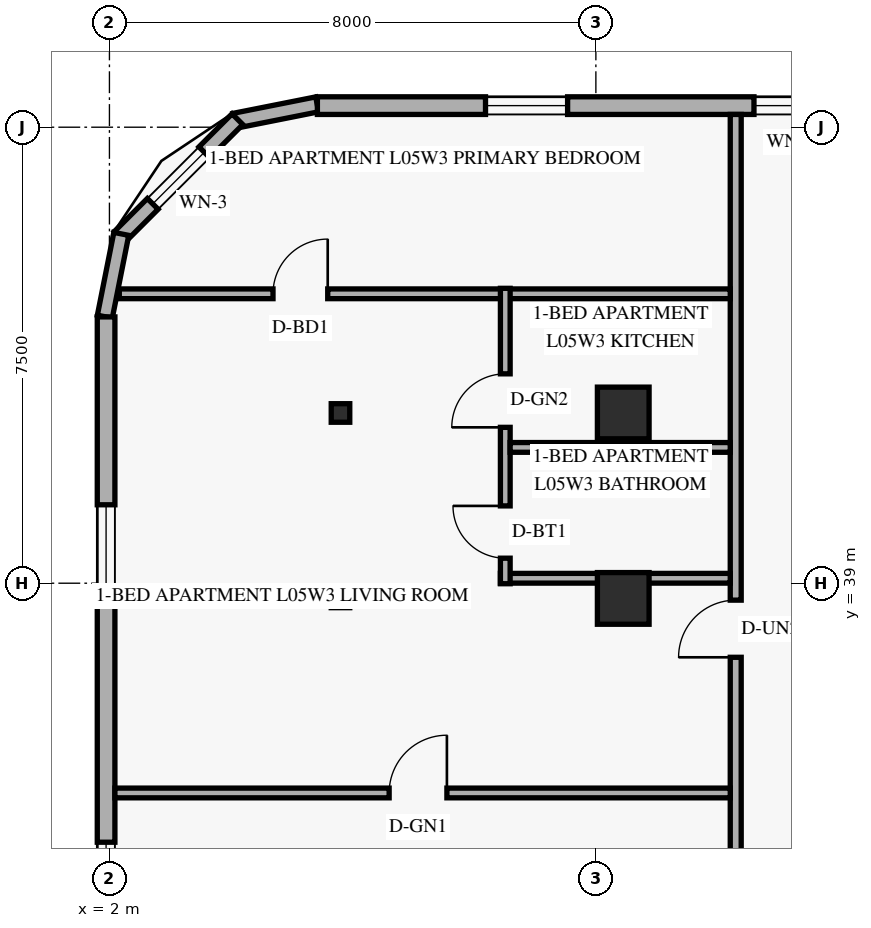
"""IFC4 building model, lengths in metres.
Left out: names, types, materials, properties, quantities, classifications, styles, units other than length and angle.
Written with IfcOpenShell. Run it as: python <this file> out.ifc"""

import sys

from ifc_helpers import new_model, si_unit, direction, frame, frame_2d, origin, origin_2d, place, context, subcontext, project, spatial, rectangle, hollow_rectangle, extrude, element, fill, save


model = new_model("IFC4")
c1 = context("Model", 3, precision=1e-05, world=origin(), true_north=direction((0.0, 1.0)))
c2 = subcontext(c1, "Body", "Model", "MODEL_VIEW")
j1 = project(units=[si_unit("LENGTHUNIT", "METRE"), si_unit("PLANEANGLEUNIT", "RADIAN")], contexts=[c1])
p1 = place(None, origin())
s1 = spatial("IfcSite", under=j1, at=p1, CompositionType="ELEMENT")
p2 = place(p1, origin())
s2 = spatial("IfcBuilding", under=s1, at=p2, CompositionType="ELEMENT")
p3 = place(p2, frame((0.0, 0.0, 24.0)))
s3 = spatial("IfcBuildingStorey", under=s2, at=p3, CompositionType="ELEMENT", Elevation=24.0)
for number, where, z_axis, x_axis in (
    (1, (5.8, 38.75, -0.3), (0.0, 0.0, 1.0), (1.0, 0.0, 0.0)),
    (2, (5.8, 41.8, -0.3), (0.0, 0.0, 1.0), (1.0, 0.0, 0.0)),
):
    element("IfcColumn", number, at=place(p3, frame(where, z_axis=z_axis, x_axis=x_axis)), inside=s3, PredefinedType="COLUMN", context=c2, shape_type="SweptSolid", body=[
        extrude(hollow_rectangle(XDim=0.305, YDim=0.305, WallThickness=0.013, at=origin_2d()), origin(), (0.0, 0.0, 1.0), 3.9),
    ])
for number, where, z_axis, x_axis in (
    (3, (10.45, 38.75, 0.0), (0.0, 0.0, 1.0), (1.0, 0.0, 0.0)),
    (4, (10.45, 41.8, 0.0), (0.0, 0.0, 1.0), (1.0, 0.0, 0.0)),
):
    element("IfcColumn", number, at=place(p3, frame(where, z_axis=z_axis, x_axis=x_axis)), inside=s3, PredefinedType="COLUMN", context=c2, shape_type="SweptSolid", body=[
        extrude(rectangle(XDim=0.85, YDim=0.85, at=origin_2d()), origin(), (0.0, 0.0, 1.0), 3.6),
    ])
p4 = place(p3, frame((5.417, 46.876, 0.0), z_axis=(0.0, 0.0, 1.0), x_axis=(-0.980809899341, -0.19496651342, 0.0)))
e5 = element("IfcWall", 5, at=p4, inside=s3, PredefinedType="SOLIDWALL", context=c2, shape_type="SweptSolid", body=[
    extrude(rectangle(XDim=1.389, YDim=0.25, at=frame_2d((0.694, 0.0))), origin(), (0.0, 0.0, 1.0), 3.36),
])
p5 = place(p3, frame((4.105, 46.632, 0.0), z_axis=(0.0, 0.0, 1.0), x_axis=(-0.707106781187, -0.707106781187, 0.0)))
e6 = element("IfcWall", 6, at=p5, inside=s3, PredefinedType="SOLIDWALL", context=c2, shape_type="SweptSolid", body=[
    extrude(rectangle(XDim=2.739, YDim=0.25, at=frame_2d((1.37, 0.0))), origin(), (0.0, 0.0, 1.0), 3.36),
])
p6 = place(p5, frame((0.77, 0.0, 0.85)))
e7 = element("IfcOpeningElement", 7, at=p6, cuts=e6, PredefinedType="OPENING", context=c2, shape_type="SweptSolid", body=[
    extrude(rectangle(XDim=1.2, YDim=1.5, at=frame_2d((0.6, 0.75))), frame((0.0, 0.135, 0.0), z_axis=(0.0, -1.0, 0.0), x_axis=(1.0, 0.0, 0.0)), (0.0, 0.0, 1.0), 0.27),
])
p7 = place(p3, frame((2.195, 44.746, 0.0), z_axis=(0.0, 0.0, 1.0), x_axis=(-0.19496651342, -0.980809899341, 0.0)))
e8 = element("IfcWall", 8, at=p7, inside=s3, PredefinedType="SOLIDWALL", context=c2, shape_type="SweptSolid", body=[
    extrude(rectangle(XDim=1.389, YDim=0.25, at=frame_2d((0.694, 0.0))), origin(), (0.0, 0.0, 1.0), 3.36),
])
p8 = place(p3, frame((44.98, 46.855, 0.0), z_axis=(0.0, 0.0, 1.0), x_axis=(-1.0, 0.0, 0.0)))
e9 = element("IfcWall", 9, at=p8, inside=s3, PredefinedType="SOLIDWALL", context=c2, shape_type="SweptSolid", body=[
    extrude(rectangle(XDim=39.56, YDim=0.29, at=frame_2d((19.78, 0.0))), origin(), (0.0, 0.0, 1.0), 3.36),
])
p9 = place(p8, frame((35.445, 0.0, 0.85)))
e10 = element("IfcOpeningElement", 10, at=p9, cuts=e9, PredefinedType="OPENING", context=c2, shape_type="SweptSolid", body=[
    extrude(rectangle(XDim=1.35, YDim=1.55, at=frame_2d((0.675, 0.775))), frame((0.0, 0.155, 0.0), z_axis=(0.0, -1.0, 0.0), x_axis=(1.0, 0.0, 0.0)), (0.0, 0.0, 1.0), 0.31),
])
p10 = place(p8, frame((31.18, 0.0, 0.85)))
e11 = element("IfcOpeningElement", 11, at=p10, cuts=e9, PredefinedType="OPENING", context=c2, shape_type="SweptSolid", body=[
    extrude(rectangle(XDim=1.2, YDim=1.5, at=frame_2d((0.6, 0.75))), frame((0.0, 0.155, 0.0), z_axis=(0.0, -1.0, 0.0), x_axis=(1.0, 0.0, 0.0)), (0.0, 0.0, 1.0), 0.31),
])
p11 = place(p8, frame((26.85, 0.0, 0.85)))
e12 = element("IfcOpeningElement", 12, at=p11, cuts=e9, PredefinedType="OPENING", context=c2, shape_type="SweptSolid", body=[
    extrude(rectangle(XDim=1.35, YDim=1.55, at=frame_2d((0.675, 0.775))), frame((0.0, 0.155, 0.0), z_axis=(0.0, -1.0, 0.0), x_axis=(1.0, 0.0, 0.0)), (0.0, 0.0, 1.0), 0.31),
])
p12 = place(p8, frame((21.425, 0.0, 0.85)))
e13 = element("IfcOpeningElement", 13, at=p12, cuts=e9, PredefinedType="OPENING", context=c2, shape_type="SweptSolid", body=[
    extrude(rectangle(XDim=1.35, YDim=1.55, at=frame_2d((0.675, 0.775))), frame((0.0, 0.155, 0.0), z_axis=(0.0, -1.0, 0.0), x_axis=(1.0, 0.0, 0.0)), (0.0, 0.0, 1.0), 0.31),
])
p13 = place(p8, frame((16.19, 0.0, 0.85)))
e14 = element("IfcOpeningElement", 14, at=p13, cuts=e9, PredefinedType="OPENING", context=c2, shape_type="SweptSolid", body=[
    extrude(rectangle(XDim=1.35, YDim=1.55, at=frame_2d((0.675, 0.775))), frame((0.0, 0.155, 0.0), z_axis=(0.0, -1.0, 0.0), x_axis=(1.0, 0.0, 0.0)), (0.0, 0.0, 1.0), 0.31),
])
p14 = place(p8, frame((10.955, 0.0, 0.85)))
e15 = element("IfcOpeningElement", 15, at=p14, cuts=e9, PredefinedType="OPENING", context=c2, shape_type="SweptSolid", body=[
    extrude(rectangle(XDim=1.35, YDim=1.55, at=frame_2d((0.675, 0.775))), frame((0.0, 0.155, 0.0), z_axis=(0.0, -1.0, 0.0), x_axis=(1.0, 0.0, 0.0)), (0.0, 0.0, 1.0), 0.31),
])
p15 = place(p8, frame((7.82, 0.0, 0.85)))
e16 = element("IfcOpeningElement", 16, at=p15, cuts=e9, PredefinedType="OPENING", context=c2, shape_type="SweptSolid", body=[
    extrude(rectangle(XDim=1.35, YDim=1.55, at=frame_2d((0.675, 0.775))), frame((0.0, 0.155, 0.0), z_axis=(0.0, -1.0, 0.0), x_axis=(1.0, 0.0, 0.0)), (0.0, 0.0, 1.0), 0.31),
])
p16 = place(p8, frame((3.04, 0.0, 0.85)))
e17 = element("IfcOpeningElement", 17, at=p16, cuts=e9, PredefinedType="OPENING", context=c2, shape_type="SweptSolid", body=[
    extrude(rectangle(XDim=1.35, YDim=1.55, at=frame_2d((0.675, 0.775))), frame((0.0, 0.155, 0.0), z_axis=(0.0, -1.0, 0.0), x_axis=(1.0, 0.0, 0.0)), (0.0, 0.0, 1.0), 0.31),
])
p17 = place(p3, frame((1.945, 43.38, 0.0), z_axis=(0.0, 0.0, 1.0), x_axis=(0.0, -1.0, 0.0)))
e18 = element("IfcWall", 18, at=p17, inside=s3, PredefinedType="SOLIDWALL", context=c2, shape_type="SweptSolid", body=[
    extrude(rectangle(XDim=38.76, YDim=0.29, at=frame_2d((19.38, 0.0))), origin(), (0.0, 0.0, 1.0), 3.36),
])
p18 = place(p17, frame((31.925, 0.0, 0.85)))
e19 = element("IfcOpeningElement", 19, at=p18, cuts=e18, PredefinedType="OPENING", context=c2, shape_type="SweptSolid", body=[
    extrude(rectangle(XDim=1.65, YDim=1.6, at=frame_2d((0.825, 0.8))), frame((0.0, 0.155, 0.0), z_axis=(0.0, -1.0, 0.0), x_axis=(1.0, 0.0, 0.0)), (0.0, 0.0, 1.0), 0.31),
])
p19 = place(p17, frame((23.913, 0.0, 0.85)))
e20 = element("IfcOpeningElement", 20, at=p19, cuts=e18, PredefinedType="OPENING", context=c2, shape_type="SweptSolid", body=[
    extrude(rectangle(XDim=1.65, YDim=1.6, at=frame_2d((0.825, 0.8))), frame((0.0, 0.155, 0.0), z_axis=(0.0, -1.0, 0.0), x_axis=(1.0, 0.0, 0.0)), (0.0, 0.0, 1.0), 0.31),
])
p20 = place(p17, frame((18.088, 0.0, 0.85)))
e21 = element("IfcOpeningElement", 21, at=p20, cuts=e18, PredefinedType="OPENING", context=c2, shape_type="SweptSolid", body=[
    extrude(rectangle(XDim=1.65, YDim=1.6, at=frame_2d((0.825, 0.8))), frame((0.0, 0.155, 0.0), z_axis=(0.0, -1.0, 0.0), x_axis=(1.0, 0.0, 0.0)), (0.0, 0.0, 1.0), 0.31),
])
p21 = place(p17, frame((12.27, 0.0, 0.85)))
e22 = element("IfcOpeningElement", 22, at=p21, cuts=e18, PredefinedType="OPENING", context=c2, shape_type="SweptSolid", body=[
    extrude(rectangle(XDim=1.65, YDim=1.6, at=frame_2d((0.825, 0.8))), frame((0.0, 0.155, 0.0), z_axis=(0.0, -1.0, 0.0), x_axis=(1.0, 0.0, 0.0)), (0.0, 0.0, 1.0), 0.31),
])
p22 = place(p17, frame((8.64, 0.0, 0.85)))
e23 = element("IfcOpeningElement", 23, at=p22, cuts=e18, PredefinedType="OPENING", context=c2, shape_type="SweptSolid", body=[
    extrude(rectangle(XDim=1.65, YDim=1.6, at=frame_2d((0.825, 0.8))), frame((0.0, 0.155, 0.0), z_axis=(0.0, -1.0, 0.0), x_axis=(1.0, 0.0, 0.0)), (0.0, 0.0, 1.0), 0.31),
])
p23 = place(p17, frame((3.09, 0.0, 0.85)))
e24 = element("IfcOpeningElement", 24, at=p23, cuts=e18, PredefinedType="OPENING", context=c2, shape_type="SweptSolid", body=[
    extrude(rectangle(XDim=1.65, YDim=1.6, at=frame_2d((0.825, 0.8))), frame((0.0, 0.155, 0.0), z_axis=(0.0, -1.0, 0.0), x_axis=(1.0, 0.0, 0.0)), (0.0, 0.0, 1.0), 0.31),
])
p24 = place(p3, frame((12.3, 1.29, 0.0), z_axis=(0.0, 0.0, 1.0), x_axis=(0.0, 1.0, 0.0)))
e25 = element("IfcWall", 25, at=p24, inside=s3, PredefinedType="STANDARD", context=c2, shape_type="SweptSolid", body=[
    extrude(rectangle(XDim=45.42, YDim=0.18, at=frame_2d((22.71, 0.0))), origin(), (0.0, 0.0, 1.0), 2.649),
])
p25 = place(p24, frame((9.41, 0.0, 0.0)))
e26 = element("IfcOpeningElement", 26, at=p25, cuts=e25, PredefinedType="OPENING", context=c2, shape_type="SweptSolid", body=[
    extrude(rectangle(XDim=0.94, YDim=2.15, at=frame_2d((0.47, 1.075))), frame((0.0, 0.1, 0.0), z_axis=(0.0, -1.0, 0.0), x_axis=(1.0, 0.0, 0.0)), (0.0, 0.0, 1.0), 0.2),
])
p26 = place(p24, frame((21.05, 0.0, 0.0)))
e27 = element("IfcOpeningElement", 27, at=p26, cuts=e25, PredefinedType="OPENING", context=c2, shape_type="SweptSolid", body=[
    extrude(rectangle(XDim=0.94, YDim=2.15, at=frame_2d((0.47, 1.075))), frame((0.0, 0.1, 0.0), z_axis=(0.0, -1.0, 0.0), x_axis=(1.0, 0.0, 0.0)), (0.0, 0.0, 1.0), 0.2),
])
p27 = place(p24, frame((36.491, 0.0, 0.0)))
e28 = element("IfcOpeningElement", 28, at=p27, cuts=e25, PredefinedType="OPENING", context=c2, shape_type="SweptSolid", body=[
    extrude(rectangle(XDim=0.94, YDim=2.15, at=frame_2d((0.47, 1.075))), frame((0.0, 0.1, 0.0), z_axis=(0.0, -1.0, 0.0), x_axis=(1.0, 0.0, 0.0)), (0.0, 0.0, 1.0), 0.2),
])
p28 = place(p3, frame((2.162, 43.76, 0.0), z_axis=(0.0, 0.0, 1.0), x_axis=(1.0, 0.0, 0.0)))
e29 = element("IfcWall", 29, at=p28, inside=s3, PredefinedType="PARTITIONING", context=c2, shape_type="SweptSolid", body=[
    extrude(rectangle(XDim=10.048, YDim=0.16, at=frame_2d((5.024, 0.0))), origin(), (0.0, 0.0, 1.0), 3.36),
])
p29 = place(p28, frame((2.528, 0.0, 0.0)))
e30 = element("IfcOpeningElement", 30, at=p29, cuts=e29, PredefinedType="OPENING", context=c2, shape_type="SweptSolid", body=[
    extrude(rectangle(XDim=0.9, YDim=2.14, at=frame_2d((0.45, 1.07))), frame((0.0, 0.09, 0.0), z_axis=(0.0, -1.0, 0.0), x_axis=(1.0, 0.0, 0.0)), (0.0, 0.0, 1.0), 0.18),
])
p30 = place(p3, frame((8.43, 39.082, 0.0), z_axis=(0.0, 0.0, 1.0), x_axis=(1.0, 0.0, 0.0)))
e31 = element("IfcWall", 31, at=p30, inside=s3, PredefinedType="PLUMBINGWALL", context=c2, shape_type="SweptSolid", body=[
    extrude(rectangle(XDim=3.78, YDim=0.16, at=frame_2d((1.89, 0.0))), origin(), (0.0, 0.0, 1.0), 3.36),
])
p31 = place(p3, frame((8.51, 38.991, 0.0), z_axis=(0.0, 0.0, 1.0), x_axis=(0.0, 1.0, 0.0)))
e32 = element("IfcWall", 32, at=p31, inside=s3, PredefinedType="PLUMBINGWALL", context=c2, shape_type="SweptSolid", body=[
    extrude(rectangle(XDim=4.859, YDim=0.16, at=frame_2d((2.429, 0.0))), origin(), (0.0, 0.0, 1.0), 2.809),
])
p32 = place(p31, frame((0.42, 0.0, 0.0)))
e33 = element("IfcOpeningElement", 33, at=p32, cuts=e32, PredefinedType="OPENING", context=c2, shape_type="SweptSolid", body=[
    extrude(rectangle(XDim=0.86, YDim=2.12, at=frame_2d((0.43, 1.06))), frame((0.0, 0.09, 0.0), z_axis=(0.0, -1.0, 0.0), x_axis=(1.0, 0.0, 0.0)), (0.0, 0.0, 1.0), 0.18),
])
p33 = place(p31, frame((2.572, 0.0, 0.0)))
e34 = element("IfcOpeningElement", 34, at=p33, cuts=e32, PredefinedType="OPENING", context=c2, shape_type="SweptSolid", body=[
    extrude(rectangle(XDim=0.88, YDim=2.12, at=frame_2d((0.44, 1.06))), frame((0.0, 0.09, 0.0), z_axis=(0.0, -1.0, 0.0), x_axis=(1.0, 0.0, 0.0)), (0.0, 0.0, 1.0), 0.18),
])
p34 = place(p3, frame((8.59, 41.234, 0.0), z_axis=(0.0, 0.0, 1.0), x_axis=(1.0, 0.0, 0.0)))
e35 = element("IfcWall", 35, at=p34, inside=s3, PredefinedType="PLUMBINGWALL", context=c2, shape_type="SweptSolid", body=[
    extrude(rectangle(XDim=3.62, YDim=0.16, at=frame_2d((1.81, 0.0))), origin(), (0.0, 0.0, 1.0), 2.649),
])
p35 = place(p3, frame((2.09, 35.55, 0.0), z_axis=(0.0, 0.0, 1.0), x_axis=(1.0, 0.0, 0.0)))
e36 = element("IfcWall", 36, at=p35, inside=s3, PredefinedType="PARTITIONING", context=c2, shape_type="SweptSolid", body=[
    extrude(rectangle(XDim=10.12, YDim=0.16, at=frame_2d((5.06, 0.0))), origin(), (0.0, 0.0, 1.0), 2.649),
])
p36 = place(p35, frame((4.51, 0.0, 0.0)))
e37 = element("IfcOpeningElement", 37, at=p36, cuts=e36, PredefinedType="OPENING", context=c2, shape_type="SweptSolid", body=[
    extrude(rectangle(XDim=0.95, YDim=2.15, at=frame_2d((0.475, 1.075))), frame((0.0, 0.09, 0.0), z_axis=(0.0, -1.0, 0.0), x_axis=(1.0, 0.0, 0.0)), (0.0, 0.0, 1.0), 0.18),
])
p37 = place(p6, origin())
e38 = element("IfcWindow", 38, at=p37, inside=s3, PartitioningType="SINGLE_PANEL", PredefinedType="WINDOW", context=c2, shape_type="SweptSolid", body=[
    extrude(rectangle(XDim=1.2, YDim=1.5, at=frame_2d((0.6, 0.75))), frame((0.0, 0.03, 0.0), z_axis=(0.0, -1.0, 0.0), x_axis=(1.0, 0.0, 0.0)), (0.0, 0.0, 1.0), 0.06),
])
fill(e7, e38)
p38 = place(p9, origin())
e39 = element("IfcWindow", 39, at=p38, inside=s3, PartitioningType="SINGLE_PANEL", PredefinedType="WINDOW", context=c2, shape_type="SweptSolid", body=[
    extrude(rectangle(XDim=1.35, YDim=1.55, at=frame_2d((0.675, 0.775))), frame((0.0, 0.03, 0.0), z_axis=(0.0, -1.0, 0.0), x_axis=(1.0, 0.0, 0.0)), (0.0, 0.0, 1.0), 0.06),
])
fill(e10, e39)
p39 = place(p10, origin())
e40 = element("IfcWindow", 40, at=p39, inside=s3, PartitioningType="SINGLE_PANEL", PredefinedType="WINDOW", context=c2, shape_type="SweptSolid", body=[
    extrude(rectangle(XDim=1.2, YDim=1.5, at=frame_2d((0.6, 0.75))), frame((0.0, 0.03, 0.0), z_axis=(0.0, -1.0, 0.0), x_axis=(1.0, 0.0, 0.0)), (0.0, 0.0, 1.0), 0.06),
])
fill(e11, e40)
p40 = place(p22, origin())
e41 = element("IfcWindow", 41, at=p40, inside=s3, PartitioningType="SINGLE_PANEL", PredefinedType="WINDOW", context=c2, shape_type="SweptSolid", body=[
    extrude(rectangle(XDim=1.65, YDim=1.6, at=frame_2d((0.825, 0.8))), frame((0.0, 0.03, 0.0), z_axis=(0.0, -1.0, 0.0), x_axis=(1.0, 0.0, 0.0)), (0.0, 0.0, 1.0), 0.06),
])
fill(e23, e41)
p41 = place(p23, origin())
e42 = element("IfcWindow", 42, at=p41, inside=s3, PartitioningType="SINGLE_PANEL", PredefinedType="WINDOW", context=c2, shape_type="SweptSolid", body=[
    extrude(rectangle(XDim=1.65, YDim=1.6, at=frame_2d((0.825, 0.8))), frame((0.0, 0.03, 0.0), z_axis=(0.0, -1.0, 0.0), x_axis=(1.0, 0.0, 0.0)), (0.0, 0.0, 1.0), 0.06),
])
fill(e24, e42)
p42 = place(p36, origin())
e43 = element("IfcDoor", 43, at=p42, inside=s3, OperationType="SINGLE_SWING_RIGHT", PredefinedType="DOOR", context=c2, shape_type="SweptSolid", body=[
    extrude(rectangle(XDim=0.95, YDim=2.15, at=frame_2d((0.475, 1.075))), frame((0.0, 0.025, 0.0), z_axis=(0.0, -1.0, 0.0), x_axis=(1.0, 0.0, 0.0)), (0.0, 0.0, 1.0), 0.05),
])
fill(e37, e43)
p43 = place(p27, origin())
e44 = element("IfcDoor", 44, at=p43, inside=s3, OperationType="SINGLE_SWING_LEFT", PredefinedType="DOOR", context=c2, shape_type="SweptSolid", body=[
    extrude(rectangle(XDim=0.94, YDim=2.15, at=frame_2d((0.47, 1.075))), frame((0.0, 0.025, 0.0), z_axis=(0.0, -1.0, 0.0), x_axis=(1.0, 0.0, 0.0)), (0.0, 0.0, 1.0), 0.05),
])
fill(e28, e44)
p44 = place(p32, origin())
e45 = element("IfcDoor", 45, at=p44, inside=s3, OperationType="SINGLE_SWING_RIGHT", PredefinedType="DOOR", context=c2, shape_type="SweptSolid", body=[
    extrude(rectangle(XDim=0.86, YDim=2.12, at=frame_2d((0.43, 1.06))), frame((0.0, 0.025, 0.0), z_axis=(0.0, -1.0, 0.0), x_axis=(1.0, 0.0, 0.0)), (0.0, 0.0, 1.0), 0.05),
])
fill(e33, e45)
p45 = place(p33, origin())
e46 = element("IfcDoor", 46, at=p45, inside=s3, OperationType="SINGLE_SWING_LEFT", PredefinedType="DOOR", context=c2, shape_type="SweptSolid", body=[
    extrude(rectangle(XDim=0.88, YDim=2.12, at=frame_2d((0.44, 1.06))), frame((0.0, 0.025, 0.0), z_axis=(0.0, -1.0, 0.0), x_axis=(1.0, 0.0, 0.0)), (0.0, 0.0, 1.0), 0.05),
])
fill(e34, e46)
p46 = place(p29, origin())
e47 = element("IfcDoor", 47, at=p46, inside=s3, OperationType="SINGLE_SWING_RIGHT", PredefinedType="DOOR", context=c2, shape_type="SweptSolid", body=[
    extrude(rectangle(XDim=0.9, YDim=2.14, at=frame_2d((0.45, 1.07))), frame((0.0, 0.025, 0.0), z_axis=(0.0, -1.0, 0.0), x_axis=(1.0, 0.0, 0.0)), (0.0, 0.0, 1.0), 0.05),
])
fill(e30, e47)
save(model, sys.argv[1])
